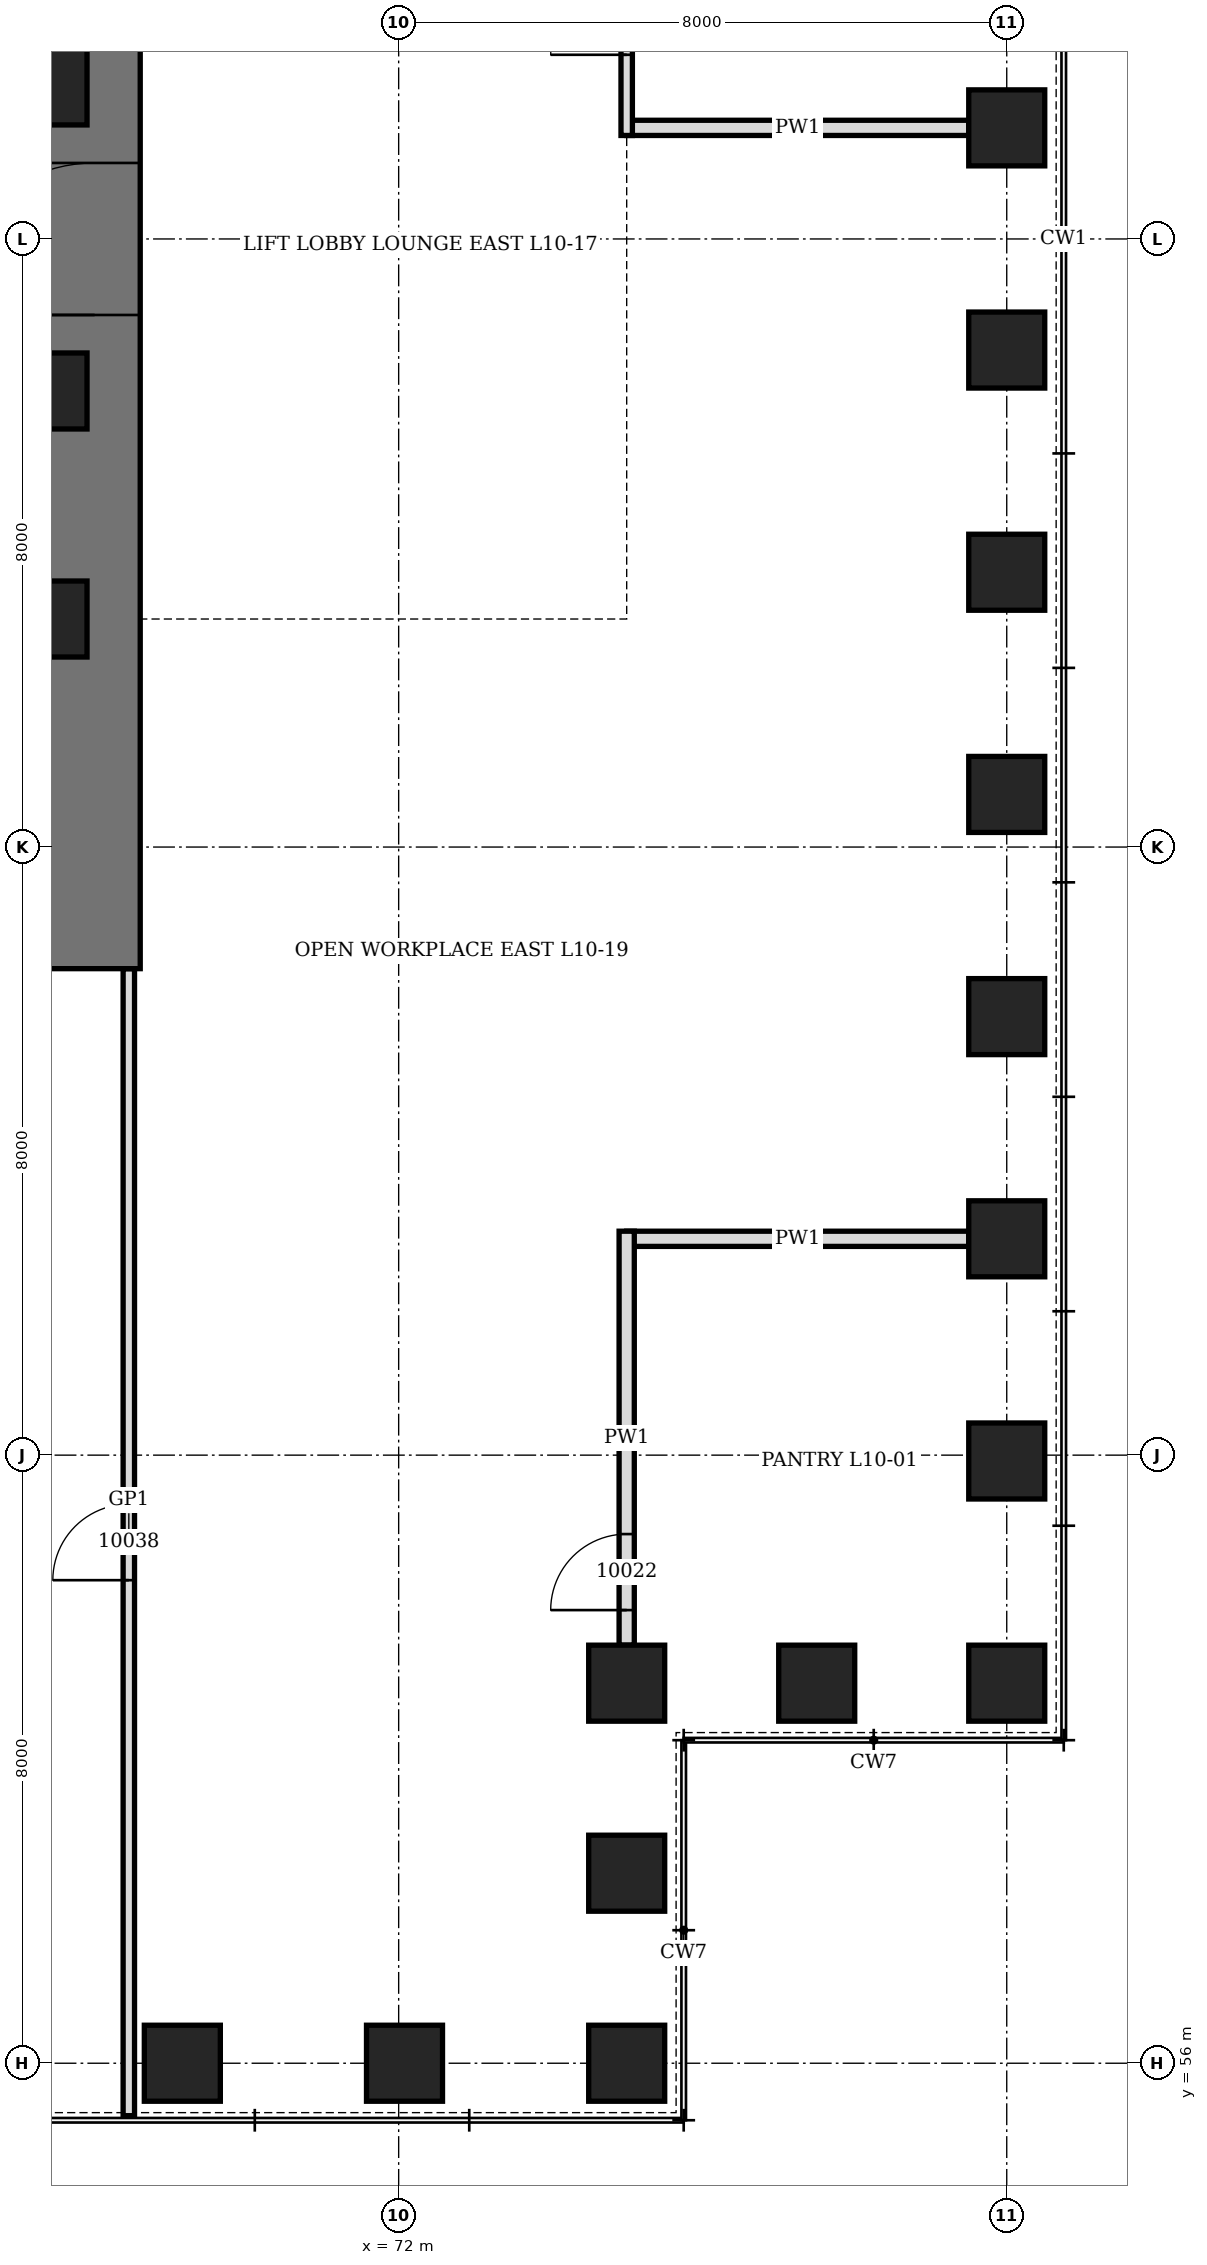
"""IFC4 building model, lengths in metres.
Left out: names, types, materials, properties, quantities, classifications, styles, units other than length and angle.
Written with IfcOpenShell. Run it as: python <this file> out.ifc"""

import sys

from ifc_helpers import new_model, si_unit, direction, frame, frame_2d, origin, origin_2d, place, context, subcontext, project, spatial, rectangle, hollow_rectangle, extrude, element, fill, save


model = new_model("IFC4")
c1 = context("Model", 3, precision=1e-05, world=origin(), true_north=direction((0.0, 1.0)))
c2 = subcontext(c1, "Body", "Model", "MODEL_VIEW")
j1 = project(units=[si_unit("LENGTHUNIT", "METRE"), si_unit("PLANEANGLEUNIT", "RADIAN")], contexts=[c1])
p1 = place(None, origin())
s1 = spatial("IfcSite", under=j1, at=p1, CompositionType="ELEMENT")
p2 = place(p1, origin())
s2 = spatial("IfcBuilding", under=s1, at=p2, CompositionType="ELEMENT")
p3 = place(p2, frame((0.0, 0.0, 51.7)))
s3 = spatial("IfcBuildingStorey", under=s2, at=p3, CompositionType="ELEMENT", Elevation=51.7)
for number, where, z_axis, x_axis in (
    (1, (69.154, 56.0, 0.0), (0.0, 0.0, 1.0), (1.0, 0.0, 0.0)),
    (2, (72.077, 56.0, 0.0), (0.0, 0.0, 1.0), (1.0, 0.0, 0.0)),
    (3, (75.0, 56.0, 0.0), (0.0, 0.0, 1.0), (0.0, 1.0, 0.0)),
    (4, (75.0, 58.5, 0.0), (0.0, 0.0, 1.0), (0.0, 1.0, 0.0)),
    (5, (75.0, 61.0, 0.0), (0.0, 0.0, 1.0), (1.0, 0.0, 0.0)),
    (6, (77.5, 61.0, 0.0), (0.0, 0.0, 1.0), (1.0, 0.0, 0.0)),
    (7, (80.0, 61.0, 0.0), (0.0, 0.0, 1.0), (0.0, 1.0, 0.0)),
    (8, (80.0, 63.923, 0.0), (0.0, 0.0, 1.0), (0.0, 1.0, 0.0)),
    (9, (80.0, 66.846, 0.0), (0.0, 0.0, 1.0), (0.0, 1.0, 0.0)),
    (10, (80.0, 69.769, 0.0), (0.0, 0.0, 1.0), (0.0, 1.0, 0.0)),
    (11, (80.0, 72.692, 0.0), (0.0, 0.0, 1.0), (0.0, 1.0, 0.0)),
    (12, (80.0, 75.615, 0.0), (0.0, 0.0, 1.0), (0.0, 1.0, 0.0)),
    (13, (80.0, 78.539, 0.0), (0.0, 0.0, 1.0), (0.0, 1.0, 0.0)),
    (14, (80.0, 81.461, 0.0), (0.0, 0.0, 1.0), (0.0, 1.0, 0.0)),
):
    element("IfcColumn", number, at=place(p3, frame(where, z_axis=z_axis, x_axis=x_axis)), inside=s3, PredefinedType="COLUMN", context=c2, shape_type="SweptSolid", body=[
        extrude(hollow_rectangle(XDim=1.0, YDim=1.0, WallThickness=0.25, at=origin_2d()), origin(), (0.0, 0.0, 1.0), 4.2),
    ])
p4 = place(p3, frame((68.0, 70.4, 0.0), z_axis=(0.0, 0.0, 1.0), x_axis=(0.0, 1.0, 0.0)))
e15 = element("IfcWall", 15, at=p4, inside=s3, PredefinedType="SHEAR", context=c2, shape_type="SweptSolid", body=[
    extrude(rectangle(XDim=19.2, YDim=1.2, at=frame_2d((9.6, 0.0))), origin(), (0.0, 0.0, 1.0), 4.2),
])
p5 = place(p4, frame((8.6, 0.0, 0.0)))
e16 = element("IfcOpeningElement", 16, at=p5, cuts=e15, PredefinedType="OPENING", context=c2, shape_type="SweptSolid", body=[
    extrude(rectangle(XDim=2.0, YDim=2.4, at=frame_2d((1.0, 1.2))), frame((0.0, 0.61, 0.0), z_axis=(0.0, -1.0, 0.0), x_axis=(1.0, 0.0, 0.0)), (0.0, 0.0, 1.0), 1.22),
])
for number, where, z_axis, x_axis in (
    (17, (67.4, 75.0, 0.0), (0.0, 0.0, 1.0), (1.0, 0.0, 0.0)),
    (18, (67.4, 78.0, 0.0), (0.0, 0.0, 1.0), (1.0, 0.0, 0.0)),
    (19, (67.4, 82.0, 0.0), (0.0, 0.0, 1.0), (1.0, 0.0, 0.0)),
):
    element("IfcColumn", number, at=place(p3, frame(where, z_axis=z_axis, x_axis=x_axis)), inside=s3, PredefinedType="COLUMN", context=c2, shape_type="SweptSolid", body=[
        extrude(hollow_rectangle(XDim=1.0, YDim=1.0, WallThickness=0.15, at=origin_2d()), origin(), (0.0, 0.0, 1.0), 4.2),
    ])
for number, where, z_axis, x_axis in (
    (20, (75.0, 66.846, 0.0), (0.0, 0.0, 1.0), (1.0, 0.0, 0.0)),
    (21, (75.0, 81.461, 0.0), (0.0, 0.0, 1.0), (1.0, 0.0, 0.0)),
):
    element("IfcWall", number, at=place(p3, frame(where, z_axis=z_axis, x_axis=x_axis)), inside=s3, PredefinedType="PARTITIONING", context=c2, shape_type="SweptSolid", body=[
        extrude(rectangle(XDim=4.5, YDim=0.2, at=frame_2d((2.25, 0.0))), origin(), (0.0, 0.0, 1.0), 3.428),
    ])
p6 = place(p3, frame((68.45, 55.31, 0.0), z_axis=(0.0, 0.0, 1.0), x_axis=(0.0, 1.0, 0.0)))
e22 = element("IfcWall", 22, at=p6, inside=s3, PredefinedType="PARTITIONING", context=c2, shape_type="SweptSolid", body=[
    extrude(rectangle(XDim=15.09, YDim=0.15, at=frame_2d((7.545, 0.0))), origin(), (0.0, 0.0, 1.0), 4.04),
])
p7 = place(p6, frame((7.045, 0.0, 0.0)))
e23 = element("IfcOpeningElement", 23, at=p7, cuts=e22, PredefinedType="OPENING", context=c2, shape_type="SweptSolid", body=[
    extrude(rectangle(XDim=1.0, YDim=2.4, at=frame_2d((0.5, 1.2))), frame((0.0, 0.085, 0.0), z_axis=(0.0, -1.0, 0.0), x_axis=(1.0, 0.0, 0.0)), (0.0, 0.0, 1.0), 0.17),
])
p8 = place(p3, frame((75.0, 81.362, 0.0), z_axis=(0.0, 0.0, 1.0), x_axis=(0.0, 1.0, 0.0)))
e24 = element("IfcWall", 24, at=p8, inside=s3, PredefinedType="PARTITIONING", context=c2, shape_type="SweptSolid", body=[
    extrude(rectangle(XDim=17.138, YDim=0.15, at=frame_2d((8.569, 0.0))), origin(), (0.0, 0.0, 1.0), 4.04),
])
p9 = place(p8, frame((1.062, 0.0, 0.0)))
e25 = element("IfcOpeningElement", 25, at=p9, cuts=e24, PredefinedType="OPENING", context=c2, shape_type="SweptSolid", body=[
    extrude(rectangle(XDim=1.0, YDim=2.1, at=frame_2d((0.5, 1.05))), frame((0.0, 0.085, 0.0), z_axis=(0.0, -1.0, 0.0), x_axis=(1.0, 0.0, 0.0)), (0.0, 0.0, 1.0), 0.17),
])
p10 = place(p8, frame((3.985, 0.0, 0.0)))
e26 = element("IfcOpeningElement", 26, at=p10, cuts=e24, PredefinedType="OPENING", context=c2, shape_type="SweptSolid", body=[
    extrude(rectangle(XDim=1.0, YDim=2.1, at=frame_2d((0.5, 1.05))), frame((0.0, 0.085, 0.0), z_axis=(0.0, -1.0, 0.0), x_axis=(1.0, 0.0, 0.0)), (0.0, 0.0, 1.0), 0.17),
])
p11 = place(p8, frame((6.908, 0.0, 0.0)))
e27 = element("IfcOpeningElement", 27, at=p11, cuts=e24, PredefinedType="OPENING", context=c2, shape_type="SweptSolid", body=[
    extrude(rectangle(XDim=1.0, YDim=2.1, at=frame_2d((0.5, 1.05))), frame((0.0, 0.085, 0.0), z_axis=(0.0, -1.0, 0.0), x_axis=(1.0, 0.0, 0.0)), (0.0, 0.0, 1.0), 0.17),
])
p12 = place(p8, frame((9.831, 0.0, 0.0)))
e28 = element("IfcOpeningElement", 28, at=p12, cuts=e24, PredefinedType="OPENING", context=c2, shape_type="SweptSolid", body=[
    extrude(rectangle(XDim=1.0, YDim=2.1, at=frame_2d((0.5, 1.05))), frame((0.0, 0.085, 0.0), z_axis=(0.0, -1.0, 0.0), x_axis=(1.0, 0.0, 0.0)), (0.0, 0.0, 1.0), 0.17),
])
p13 = place(p8, frame((12.754, 0.0, 0.0)))
e29 = element("IfcOpeningElement", 29, at=p13, cuts=e24, PredefinedType="OPENING", context=c2, shape_type="SweptSolid", body=[
    extrude(rectangle(XDim=1.0, YDim=2.1, at=frame_2d((0.5, 1.05))), frame((0.0, 0.085, 0.0), z_axis=(0.0, -1.0, 0.0), x_axis=(1.0, 0.0, 0.0)), (0.0, 0.0, 1.0), 0.17),
])
p14 = place(p8, frame((15.677, 0.0, 0.0)))
e30 = element("IfcOpeningElement", 30, at=p14, cuts=e24, PredefinedType="OPENING", context=c2, shape_type="SweptSolid", body=[
    extrude(rectangle(XDim=1.0, YDim=2.4, at=frame_2d((0.5, 1.2))), frame((0.0, 0.085, 0.0), z_axis=(0.0, -1.0, 0.0), x_axis=(1.0, 0.0, 0.0)), (0.0, 0.0, 1.0), 0.17),
])
p15 = place(p3, frame((75.0, 61.5, 0.0), z_axis=(0.0, 0.0, 1.0), x_axis=(0.0, 1.0, 0.0)))
e31 = element("IfcWall", 31, at=p15, inside=s3, PredefinedType="PARTITIONING", context=c2, shape_type="SweptSolid", body=[
    extrude(rectangle(XDim=5.446, YDim=0.2, at=frame_2d((2.723, 0.0))), origin(), (0.0, 0.0, 1.0), 4.04),
])
p16 = place(p15, frame((0.461, 0.0, 0.0)))
e32 = element("IfcOpeningElement", 32, at=p16, cuts=e31, PredefinedType="OPENING", context=c2, shape_type="SweptSolid", body=[
    extrude(rectangle(XDim=1.0, YDim=2.1, at=frame_2d((0.5, 1.05))), frame((0.0, 0.11, 0.0), z_axis=(0.0, -1.0, 0.0), x_axis=(1.0, 0.0, 0.0)), (0.0, 0.0, 1.0), 0.22),
])
p17 = place(p5, origin())
e33 = element("IfcDoor", 33, at=p17, inside=s3, OperationType="DOUBLE_DOOR_SINGLE_SWING", PredefinedType="DOOR", context=c2, shape_type="SweptSolid", body=[
    extrude(rectangle(XDim=2.0, YDim=2.4, at=frame_2d((1.0, 1.2))), frame((0.0, 0.35, 0.0), z_axis=(0.0, -1.0, 0.0), x_axis=(1.0, 0.0, 0.0)), (0.0, 0.0, 1.0), 0.7),
])
fill(e16, e33)
p18 = place(p16, origin())
e34 = element("IfcDoor", 34, at=p18, inside=s3, OperationType="SINGLE_SWING_LEFT", PredefinedType="DOOR", context=c2, shape_type="SweptSolid", body=[
    extrude(rectangle(XDim=1.0, YDim=2.1, at=frame_2d((0.5, 1.05))), frame((0.0, 0.1, 0.0), z_axis=(0.0, -1.0, 0.0), x_axis=(1.0, 0.0, 0.0)), (0.0, 0.0, 1.0), 0.199),
])
fill(e32, e34)
p19 = place(p9, origin())
e35 = element("IfcDoor", 35, at=p19, inside=s3, OperationType="SINGLE_SWING_LEFT", PredefinedType="DOOR", context=c2, shape_type="SweptSolid", body=[
    extrude(rectangle(XDim=1.0, YDim=2.1, at=frame_2d((0.5, 1.05))), frame((0.0, 0.075, 0.0), z_axis=(0.0, -1.0, 0.0), x_axis=(1.0, 0.0, 0.0)), (0.0, 0.0, 1.0), 0.149),
])
fill(e25, e35)
p20 = place(p7, origin())
e36 = element("IfcDoor", 36, at=p20, inside=s3, OperationType="SINGLE_SWING_RIGHT", PredefinedType="DOOR", context=c2, shape_type="SweptSolid", body=[
    extrude(rectangle(XDim=1.0, YDim=2.4, at=frame_2d((0.5, 1.2))), frame((0.0, 0.075, 0.0), z_axis=(0.0, -1.0, 0.0), x_axis=(1.0, 0.0, 0.0)), (0.0, 0.0, 1.0), 0.149),
])
fill(e23, e36)
save(model, sys.argv[1])
